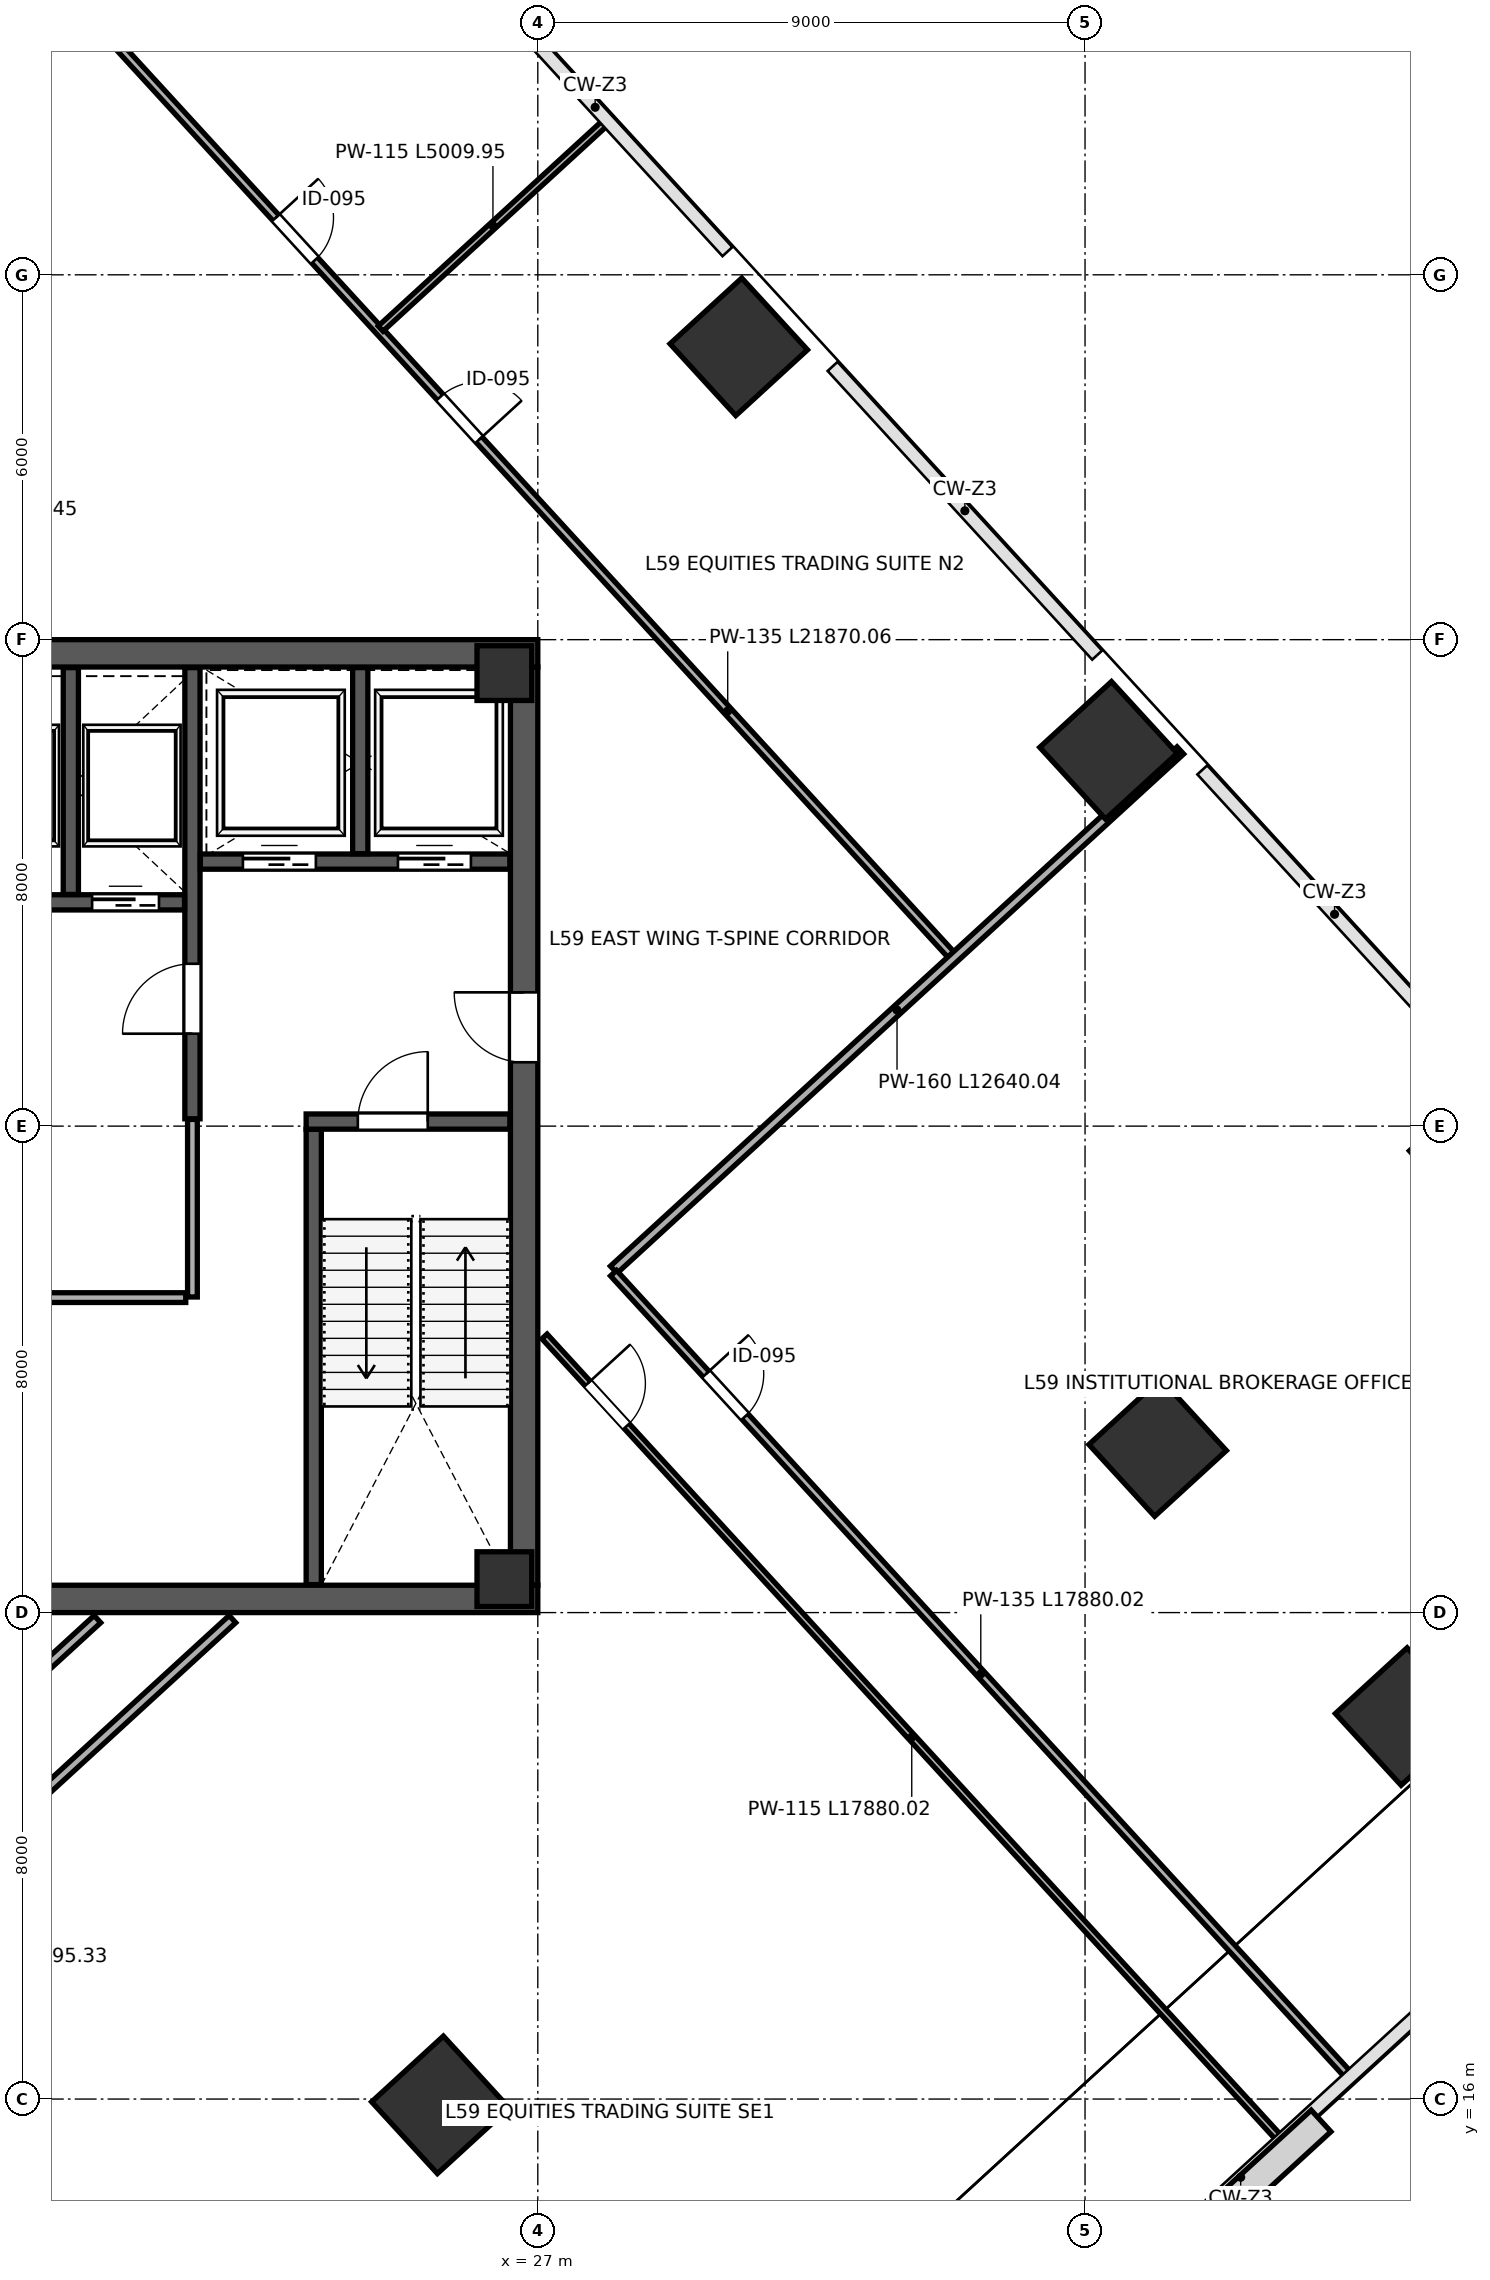
"""IFC4 building model, lengths in metres.
Left out: names, types, materials, properties, quantities, classifications, styles, units other than length and angle.
Written with IfcOpenShell. Run it as: python <this file> out.ifc"""

import sys

from ifc_helpers import new_model, si_unit, direction, frame, frame_2d, origin, origin_2d, place, context, subcontext, project, spatial, rectangle, extrude, source, transform, mapped, element, fill, save


model = new_model("IFC4")
c1 = context("Model", 3, precision=1e-05, world=origin(), true_north=direction((0.0, 1.0)))
c2 = subcontext(c1, "Body", "Model", "MODEL_VIEW")
j1 = project(units=[si_unit("LENGTHUNIT", "METRE"), si_unit("PLANEANGLEUNIT", "RADIAN")], contexts=[c1])
p1 = place(None, origin())
s1 = spatial("IfcSite", under=j1, at=p1, CompositionType="ELEMENT")
p2 = place(p1, origin())
s2 = spatial("IfcBuilding", under=s1, at=p2, CompositionType="ELEMENT")
p3 = place(p2, frame((0.0, 0.0, 262.6)))
s3 = spatial("IfcBuildingStorey", under=s2, at=p3, CompositionType="ELEMENT", Elevation=262.6)
m1 = source(origin(), c2, "Body", "SweptSolid", [
    extrude(rectangle(XDim=0.9, YDim=0.9, at=origin_2d()), origin(), (0.0, 0.0, 1.0), 4.198),
])
for number, where, z_axis, x_axis in (
    (1, (26.45, 24.55, 0.001), (0.0, 0.0, 1.0), (1.0, 0.0, 0.0)),
    (2, (26.45, 39.45, 0.001), (0.0, 0.0, 1.0), (1.0, 0.0, 0.0)),
):
    element("IfcColumn", number, at=place(p3, frame(where, z_axis=z_axis, x_axis=x_axis)), inside=s3, PredefinedType="COLUMN", context=c2, shape_type="MappedRepresentation", body=[
        mapped(m1, transform((0.0, 0.0, 0.0), scale=1.0)),
    ])
m2 = source(origin(), c2, "Body", "SweptSolid", [
    extrude(rectangle(XDim=1.6, YDim=1.6, at=origin_2d()), origin(), (0.0, 0.0, 1.0), 4.198),
])
for number, where, z_axis, x_axis in (
    (3, (30.305, 44.816, 0.001), (0.0, 0.0, 1.0), (-0.676, 0.737, 0.0)),
    (4, (36.385, 38.18, 0.001), (0.0, 0.0, 1.0), (-0.676, 0.737, 0.0)),
):
    element("IfcColumn", number, at=place(p3, frame(where, z_axis=z_axis, x_axis=x_axis)), inside=s3, PredefinedType="COLUMN", context=c2, shape_type="MappedRepresentation", body=[
        mapped(m2, transform((0.0, 0.0, 0.0), scale=1.0)),
    ])
m3 = source(origin(), c2, "Body", "SweptSolid", [
    extrude(rectangle(XDim=1.6, YDim=1.6, at=origin_2d()), origin(), (0.0, 0.0, 1.0), 4.198),
])
for number, where, z_axis, x_axis in (
    (5, (25.398, 15.905, 0.001), (0.0, 0.0, 1.0), (-0.676, 0.737, 0.0)),
    (6, (37.194, 26.714, 0.001), (0.0, 0.0, 1.0), (-0.676, 0.737, 0.0)),
):
    element("IfcColumn", number, at=place(p3, frame(where, z_axis=z_axis, x_axis=x_axis)), inside=s3, PredefinedType="COLUMN", context=c2, shape_type="MappedRepresentation", body=[
        mapped(m3, transform((0.0, 0.0, 0.0), scale=1.0)),
    ])
for number, where, z_axis, x_axis in (
    (7, (42.466, 31.545, 0.001), (0.0, 0.0, 1.0), (-0.676, 0.737, 0.0)),
    (8, (41.248, 22.291, 0.001), (0.0, 0.0, 1.0), (-0.676, 0.737, 0.0)),
):
    element("IfcColumn", number, at=place(p3, frame(where, z_axis=z_axis, x_axis=x_axis)), inside=s3, PredefinedType="COLUMN", context=c2, shape_type="MappedRepresentation", body=[
        mapped(m2, transform((0.0, 0.0, 0.0), scale=1.0)),
    ])
p4 = place(p3, frame((26.775, 24.45, 0.0), z_axis=(0.0, 0.0, 1.0), x_axis=(0.0, 1.0, 0.0)))
e9 = element("IfcWall", 9, at=p4, inside=s3, PredefinedType="SHEAR", context=c2, shape_type="SweptSolid", body=[
    extrude(rectangle(XDim=15.1, YDim=0.45, at=frame_2d((7.55, 0.0))), origin(), (0.0, 0.0, 1.0), 3.96),
])
p5 = place(p4, frame((8.6, 0.0, 0.0)))
e10 = element("IfcOpeningElement", 10, at=p5, cuts=e9, PredefinedType="OPENING", context=c2, shape_type="SweptSolid", body=[
    extrude(rectangle(XDim=1.15, YDim=2.2, at=frame_2d((0.575, 1.1))), frame((0.0, 0.235, 0.0), z_axis=(0.0, -1.0, 0.0), x_axis=(1.0, 0.0, 0.0)), (0.0, 0.0, 1.0), 0.47),
])
for number, where, z_axis, x_axis in (
    (11, (9.0, 24.225, 0.0), (0.0, 0.0, 1.0), (1.0, 0.0, 0.0)),
    (12, (9.0, 39.775, 0.0), (0.0, 0.0, 1.0), (1.0, 0.0, 0.0)),
):
    element("IfcWall", number, at=place(p3, frame(where, z_axis=z_axis, x_axis=x_axis)), inside=s3, PredefinedType="SHEAR", context=c2, shape_type="SweptSolid", body=[
        extrude(rectangle(XDim=18.0, YDim=0.45, at=frame_2d((9.0, 0.0))), origin(), (0.0, 0.0, 1.0), 3.96),
    ])
p6 = place(p3, frame((23.315, 24.46, 0.0), z_axis=(0.0, 0.0, 1.0), x_axis=(0.0, 1.0, 0.0)))
e13 = element("IfcWall", 13, at=p6, inside=s3, PredefinedType="SHEAR", context=c2, shape_type="SweptSolid", body=[
    extrude(rectangle(XDim=7.49, YDim=0.25, at=frame_2d((3.745, 0.0))), origin(), (0.0, 0.0, 1.0), 3.96),
])
p7 = place(p3, frame((23.19, 32.075, 0.0), z_axis=(0.0, 0.0, 1.0), x_axis=(1.0, 0.0, 0.0)))
e14 = element("IfcWall", 14, at=p7, inside=s3, PredefinedType="SHEAR", context=c2, shape_type="SweptSolid", body=[
    extrude(rectangle(XDim=3.35, YDim=0.25, at=frame_2d((1.675, 0.0))), origin(), (0.0, 0.0, 1.0), 3.96),
])
p8 = place(p7, frame((0.85, 0.0, 0.0)))
e15 = element("IfcOpeningElement", 15, at=p8, cuts=e14, PredefinedType="OPENING", context=c2, shape_type="SweptSolid", body=[
    extrude(rectangle(XDim=1.15, YDim=2.2, at=frame_2d((0.575, 1.1))), frame((0.0, 0.135, 0.0), z_axis=(0.0, -1.0, 0.0), x_axis=(1.0, 0.0, 0.0)), (0.0, 0.0, 1.0), 0.27),
])
p9 = place(p3, frame((21.32, 32.12, 0.0), z_axis=(0.0, 0.0, 1.0), x_axis=(0.0, 1.0, 0.0)))
e16 = element("IfcWall", 16, at=p9, inside=s3, PredefinedType="SHEAR", context=c2, shape_type="SweptSolid", body=[
    extrude(rectangle(XDim=7.42, YDim=0.25, at=frame_2d((3.71, 0.0))), origin(), (0.0, 0.0, 1.0), 3.96),
])
p10 = place(p9, frame((1.4, 0.0, 0.0)))
e17 = element("IfcOpeningElement", 17, at=p10, cuts=e16, PredefinedType="OPENING", context=c2, shape_type="SweptSolid", body=[
    extrude(rectangle(XDim=1.15, YDim=2.2, at=frame_2d((0.575, 1.1))), frame((0.0, 0.135, 0.0), z_axis=(0.0, -1.0, 0.0), x_axis=(1.0, 0.0, 0.0)), (0.0, 0.0, 1.0), 0.27),
])
p11 = place(p3, frame((21.45, 36.35, 0.0), z_axis=(0.0, 0.0, 1.0), x_axis=(1.0, 0.0, 0.0)))
e18 = element("IfcWall", 18, at=p11, inside=s3, PredefinedType="SHEAR", context=c2, shape_type="SweptSolid", body=[
    extrude(rectangle(XDim=5.09, YDim=0.25, at=frame_2d((2.545, 0.0))), origin(), (0.0, 0.0, 1.0), 3.96),
])
p12 = place(p11, frame((0.7, 0.0, 0.0)))
e19 = element("IfcOpeningElement", 19, at=p12, cuts=e18, PredefinedType="OPENING", context=c2, shape_type="SweptSolid", body=[
    extrude(rectangle(XDim=1.2, YDim=2.2, at=frame_2d((0.6, 1.1))), frame((0.0, 0.135, 0.0), z_axis=(0.0, -1.0, 0.0), x_axis=(1.0, 0.0, 0.0)), (0.0, 0.0, 1.0), 0.27),
])
p13 = place(p11, frame((3.25, 0.0, 0.0)))
e20 = element("IfcOpeningElement", 20, at=p13, cuts=e18, PredefinedType="OPENING", context=c2, shape_type="SweptSolid", body=[
    extrude(rectangle(XDim=1.2, YDim=2.2, at=frame_2d((0.6, 1.1))), frame((0.0, 0.135, 0.0), z_axis=(0.0, -1.0, 0.0), x_axis=(1.0, 0.0, 0.0)), (0.0, 0.0, 1.0), 0.27),
])
p14 = place(p3, frame((24.08, 36.48, 0.0), z_axis=(0.0, 0.0, 1.0), x_axis=(0.0, 1.0, 0.0)))
e21 = element("IfcWall", 21, at=p14, inside=s3, PredefinedType="SHEAR", context=c2, shape_type="SweptSolid", body=[
    extrude(rectangle(XDim=3.06, YDim=0.25, at=frame_2d((1.53, 0.0))), origin(), (0.0, 0.0, 1.0), 3.96),
])
p15 = place(p3, frame((17.32, 35.68, 0.0), z_axis=(0.0, 0.0, 1.0), x_axis=(1.0, 0.0, 0.0)))
e22 = element("IfcWall", 22, at=p15, inside=s3, PredefinedType="SHEAR", context=c2, shape_type="SweptSolid", body=[
    extrude(rectangle(XDim=3.87, YDim=0.25, at=frame_2d((1.935, 0.0))), origin(), (0.0, 0.0, 1.0), 3.96),
])
p16 = place(p15, frame((0.45, 0.0, 0.0)))
e23 = element("IfcOpeningElement", 23, at=p16, cuts=e22, PredefinedType="OPENING", context=c2, shape_type="SweptSolid", body=[
    extrude(rectangle(XDim=1.1, YDim=2.2, at=frame_2d((0.55, 1.1))), frame((0.0, 0.135, 0.0), z_axis=(0.0, -1.0, 0.0), x_axis=(1.0, 0.0, 0.0)), (0.0, 0.0, 1.0), 0.27),
])
p17 = place(p15, frame((2.35, 0.0, 0.0)))
e24 = element("IfcOpeningElement", 24, at=p17, cuts=e22, PredefinedType="OPENING", context=c2, shape_type="SweptSolid", body=[
    extrude(rectangle(XDim=1.1, YDim=2.2, at=frame_2d((0.55, 1.1))), frame((0.0, 0.135, 0.0), z_axis=(0.0, -1.0, 0.0), x_axis=(1.0, 0.0, 0.0)), (0.0, 0.0, 1.0), 0.27),
])
p18 = place(p3, frame((19.32, 35.81, 0.0), z_axis=(0.0, 0.0, 1.0), x_axis=(0.0, 1.0, 0.0)))
e25 = element("IfcWall", 25, at=p18, inside=s3, PredefinedType="SHEAR", context=c2, shape_type="SweptSolid", body=[
    extrude(rectangle(XDim=3.73, YDim=0.25, at=frame_2d((1.865, 0.0))), origin(), (0.0, 0.0, 1.0), 3.96),
])
p19 = place(p3, frame((12.84, 29.18, 0.0), z_axis=(0.0, 0.0, 1.0), x_axis=(1.0, 0.0, 0.0)))
e26 = element("IfcWall", 26, at=p19, inside=s3, PredefinedType="PARTITIONING", context=c2, shape_type="SweptSolid", body=[
    extrude(rectangle(XDim=8.37, YDim=0.16, at=frame_2d((4.185, 0.0))), origin(), (0.0, 0.0, 1.0), 3.96),
])
p20 = place(p19, frame((2.6, 0.0, 0.0)))
e27 = element("IfcOpeningElement", 27, at=p20, cuts=e26, PredefinedType="OPENING", context=c2, shape_type="SweptSolid", body=[
    extrude(rectangle(XDim=0.9, YDim=2.15, at=frame_2d((0.45, 1.075))), frame((0.0, 0.09, 0.0), z_axis=(0.0, -1.0, 0.0), x_axis=(1.0, 0.0, 0.0)), (0.0, 0.0, 1.0), 0.18),
])
p21 = place(p3, frame((21.32, 29.19, 0.0), z_axis=(0.0, 0.0, 1.0), x_axis=(0.0, 1.0, 0.0)))
e28 = element("IfcWall", 28, at=p21, inside=s3, PredefinedType="PARTITIONING", context=c2, shape_type="SweptSolid", body=[
    extrude(rectangle(XDim=2.92, YDim=0.16, at=frame_2d((1.46, 0.0))), origin(), (0.0, 0.0, 1.0), 3.96),
])
p22 = place(p3, frame((13.765, 18.402, 0.0), z_axis=(0.0, 0.0, 1.0), x_axis=(0.737266340408, 0.675602207887, 0.0)))
e29 = element("IfcWall", 29, at=p22, inside=s3, PredefinedType="PARTITIONING", context=c2, shape_type="SweptSolid", body=[
    extrude(rectangle(XDim=8.128, YDim=0.16, at=frame_2d((4.064, 0.0))), origin(), (0.0, 0.0, 1.0), 3.96),
])
p23 = place(p3, frame((19.042, 50.92, 0.0), z_axis=(0.0, 0.0, 1.0), x_axis=(0.675589646996, -0.737277850523, 0.0)))
e30 = element("IfcWall", 30, at=p23, inside=s3, PredefinedType="PARTITIONING", context=c2, shape_type="SweptSolid", body=[
    extrude(rectangle(XDim=21.87, YDim=0.135, at=frame_2d((10.935, 0.0))), origin(), (0.0, 0.0, 1.0), 3.96),
])
p24 = place(p23, frame((5.4, 0.0, 0.0)))
e31 = element("IfcOpeningElement", 31, at=p24, cuts=e30, PredefinedType="OPENING", context=c2, shape_type="SweptSolid", body=[
    extrude(rectangle(XDim=0.95, YDim=2.15, at=frame_2d((0.475, 1.075))), frame((0.0, 0.078, 0.0), z_axis=(0.0, -1.0, 0.0), x_axis=(1.0, 0.0, 0.0)), (0.0, 0.0, 1.0), 0.155),
])
p25 = place(p23, frame((9.4, 0.0, 0.0)))
e32 = element("IfcOpeningElement", 32, at=p25, cuts=e30, PredefinedType="OPENING", context=c2, shape_type="SweptSolid", body=[
    extrude(rectangle(XDim=0.95, YDim=2.15, at=frame_2d((0.475, 1.075))), frame((0.0, 0.078, 0.0), z_axis=(0.0, -1.0, 0.0), x_axis=(1.0, 0.0, 0.0)), (0.0, 0.0, 1.0), 0.155),
])
p26 = place(p3, frame((24.415, 45.115, 0.0), z_axis=(0.0, 0.0, 1.0), x_axis=(0.737279537385, 0.675587806101, 0.0)))
e33 = element("IfcWall", 33, at=p26, inside=s3, PredefinedType="PARTITIONING", context=c2, shape_type="SweptSolid", body=[
    extrude(rectangle(XDim=5.01, YDim=0.115, at=frame_2d((2.505, 0.0))), origin(), (0.0, 0.0, 1.0), 3.295),
])
p27 = place(p3, frame((1.393, 34.124, 0.0), z_axis=(0.0, 0.0, 1.0), x_axis=(0.737274323436, 0.675593496121, 0.0)))
e34 = element("IfcWall", 34, at=p27, inside=s3, PredefinedType="PARTITIONING", context=c2, shape_type="SweptSolid", body=[
    extrude(rectangle(XDim=27.402, YDim=0.135, at=frame_2d((13.701, 0.0))), origin(), (0.0, 0.0, 1.0), 3.96),
])
p28 = place(p3, frame((28.248, 29.639, 0.0), z_axis=(0.0, 0.0, 1.0), x_axis=(0.73728000412, 0.675587296746, 0.0)))
e35 = element("IfcWall", 35, at=p28, inside=s3, PredefinedType="PARTITIONING", context=c2, shape_type="SweptSolid", body=[
    extrude(rectangle(XDim=12.64, YDim=0.16, at=frame_2d((6.32, 0.0))), origin(), (0.0, 0.0, 1.0), 3.295),
])
p29 = place(p3, frame((12.47, 15.181, 0.0), z_axis=(0.0, 0.0, 1.0), x_axis=(0.737265724175, 0.675602880365, 0.0)))
e36 = element("IfcWall", 36, at=p29, inside=s3, PredefinedType="PARTITIONING", context=c2, shape_type="SweptSolid", body=[
    extrude(rectangle(XDim=12.895, YDim=0.16, at=frame_2d((6.448, 0.0))), origin(), (0.0, 0.0, 1.0), 3.96),
])
p30 = place(p3, frame((28.246, 29.582, 0.0), z_axis=(0.0, 0.0, 1.0), x_axis=(0.67559539026, -0.737272587758, 0.0)))
e37 = element("IfcWall", 37, at=p30, inside=s3, PredefinedType="PARTITIONING", context=c2, shape_type="SweptSolid", body=[
    extrude(rectangle(XDim=17.88, YDim=0.135, at=frame_2d((8.94, 0.0))), origin(), (0.0, 0.0, 1.0), 3.96),
])
p31 = place(p30, frame((2.25, 0.0, 0.0)))
e38 = element("IfcOpeningElement", 38, at=p31, cuts=e37, PredefinedType="OPENING", context=c2, shape_type="SweptSolid", body=[
    extrude(rectangle(XDim=0.95, YDim=2.15, at=frame_2d((0.475, 1.075))), frame((0.0, 0.078, 0.0), z_axis=(0.0, -1.0, 0.0), x_axis=(1.0, 0.0, 0.0)), (0.0, 0.0, 1.0), 0.155),
])
p32 = place(p3, frame((27.11, 28.542, 0.0), z_axis=(0.0, 0.0, 1.0), x_axis=(0.675588589041, -0.737278819957, 0.0)))
e39 = element("IfcWall", 39, at=p32, inside=s3, PredefinedType="PARTITIONING", context=c2, shape_type="SweptSolid", body=[
    extrude(rectangle(XDim=17.88, YDim=0.115, at=frame_2d((8.94, 0.0))), origin(), (0.0, 0.0, 1.0), 3.96),
])
p33 = place(p32, frame((1.05, 0.0, 0.0)))
e40 = element("IfcOpeningElement", 40, at=p33, cuts=e39, PredefinedType="OPENING", context=c2, shape_type="SweptSolid", body=[
    extrude(rectangle(XDim=0.95, YDim=2.15, at=frame_2d((0.475, 1.075))), frame((0.0, 0.067, 0.0), z_axis=(0.0, -1.0, 0.0), x_axis=(1.0, 0.0, 0.0)), (0.0, 0.0, 1.0), 0.135),
])
m4 = source(origin(), c2, "Body", "SweptSolid", [
    extrude(rectangle(XDim=1.15, YDim=2.2, at=frame_2d((0.575, 1.1))), frame((0.0, 0.025, 0.0), z_axis=(0.0, -1.0, 0.0), x_axis=(1.0, 0.0, 0.0)), (0.0, 0.0, 1.0), 0.05),
])
p34 = place(p10, origin())
e41 = element("IfcDoor", 41, at=p34, inside=s3, OperationType="SINGLE_SWING_LEFT", PredefinedType="DOOR", context=c2, shape_type="MappedRepresentation", body=[
    mapped(m4, transform((0.0, 0.0, 0.0), scale=1.0)),
])
fill(e17, e41)
m5 = source(origin(), c2, "Body", "SweptSolid", [
    extrude(rectangle(XDim=1.15, YDim=2.2, at=frame_2d((0.575, 1.1))), frame((0.0, 0.025, 0.0), z_axis=(0.0, -1.0, 0.0), x_axis=(1.0, 0.0, 0.0)), (0.0, 0.0, 1.0), 0.05),
])
p35 = place(p8, origin())
e42 = element("IfcDoor", 42, at=p35, inside=s3, OperationType="SINGLE_SWING_RIGHT", PredefinedType="DOOR", context=c2, shape_type="MappedRepresentation", body=[
    mapped(m5, transform((0.0, 0.0, 0.0), scale=1.0)),
])
fill(e15, e42)
p36 = place(p5, origin())
e43 = element("IfcDoor", 43, at=p36, inside=s3, OperationType="SINGLE_SWING_RIGHT", PredefinedType="DOOR", context=c2, shape_type="MappedRepresentation", body=[
    mapped(m4, transform((0.0, 0.0, 0.0), scale=1.0)),
])
fill(e10, e43)
m6 = source(origin(), c2, "Body", "SweptSolid", [
    extrude(rectangle(XDim=1.1, YDim=2.2, at=frame_2d((0.55, 1.1))), frame((0.0, 0.025, 0.0), z_axis=(0.0, -1.0, 0.0), x_axis=(1.0, 0.0, 0.0)), (0.0, 0.0, 1.0), 0.05),
])
p37 = place(p17, origin())
e44 = element("IfcDoor", 44, at=p37, inside=s3, OperationType="SLIDING_TO_RIGHT", PredefinedType="DOOR", context=c2, shape_type="MappedRepresentation", body=[
    mapped(m6, transform((0.0, 0.0, 0.0), scale=1.0)),
])
fill(e24, e44)
m7 = source(origin(), c2, "Body", "SweptSolid", [
    extrude(rectangle(XDim=1.2, YDim=2.2, at=frame_2d((0.6, 1.1))), frame((0.0, 0.025, 0.0), z_axis=(0.0, -1.0, 0.0), x_axis=(1.0, 0.0, 0.0)), (0.0, 0.0, 1.0), 0.05),
])
p38 = place(p12, origin())
e45 = element("IfcDoor", 45, at=p38, inside=s3, OperationType="SLIDING_TO_LEFT", PredefinedType="DOOR", context=c2, shape_type="MappedRepresentation", body=[
    mapped(m7, transform((0.0, 0.0, 0.0), scale=1.0)),
])
fill(e19, e45)
p39 = place(p13, origin())
e46 = element("IfcDoor", 46, at=p39, inside=s3, OperationType="SLIDING_TO_RIGHT", PredefinedType="DOOR", context=c2, shape_type="MappedRepresentation", body=[
    mapped(m7, transform((0.0, 0.0, 0.0), scale=1.0)),
])
fill(e20, e46)
m8 = source(origin(), c2, "Body", "SweptSolid", [
    extrude(rectangle(XDim=0.95, YDim=2.15, at=frame_2d((0.475, 1.075))), frame((0.0, 0.025, 0.0), z_axis=(0.0, -1.0, 0.0), x_axis=(1.0, 0.0, 0.0)), (0.0, 0.0, 1.0), 0.05),
])
p40 = place(p24, origin())
e47 = element("IfcDoor", 47, at=p40, inside=s3, OperationType="SINGLE_SWING_LEFT", PredefinedType="DOOR", context=c2, shape_type="MappedRepresentation", body=[
    mapped(m8, transform((0.0, 0.0, 0.0), scale=1.0)),
])
fill(e31, e47)
p41 = place(p25, origin())
e48 = element("IfcDoor", 48, at=p41, inside=s3, OperationType="SINGLE_SWING_RIGHT", PredefinedType="DOOR", context=c2, shape_type="MappedRepresentation", body=[
    mapped(m8, transform((0.0, 0.0, 0.0), scale=1.0)),
])
fill(e32, e48)
p42 = place(p31, origin())
e49 = element("IfcDoor", 49, at=p42, inside=s3, OperationType="SINGLE_SWING_LEFT", PredefinedType="DOOR", context=c2, shape_type="MappedRepresentation", body=[
    mapped(m8, transform((0.0, 0.0, 0.0), scale=1.0)),
])
fill(e38, e49)
p43 = place(p33, origin())
e50 = element("IfcDoor", 50, at=p43, inside=s3, OperationType="SINGLE_SWING_LEFT", PredefinedType="DOOR", context=c2, shape_type="MappedRepresentation", body=[
    mapped(m8, transform((0.0, 0.0, 0.0), scale=1.0)),
])
fill(e40, e50)
save(model, sys.argv[1])
